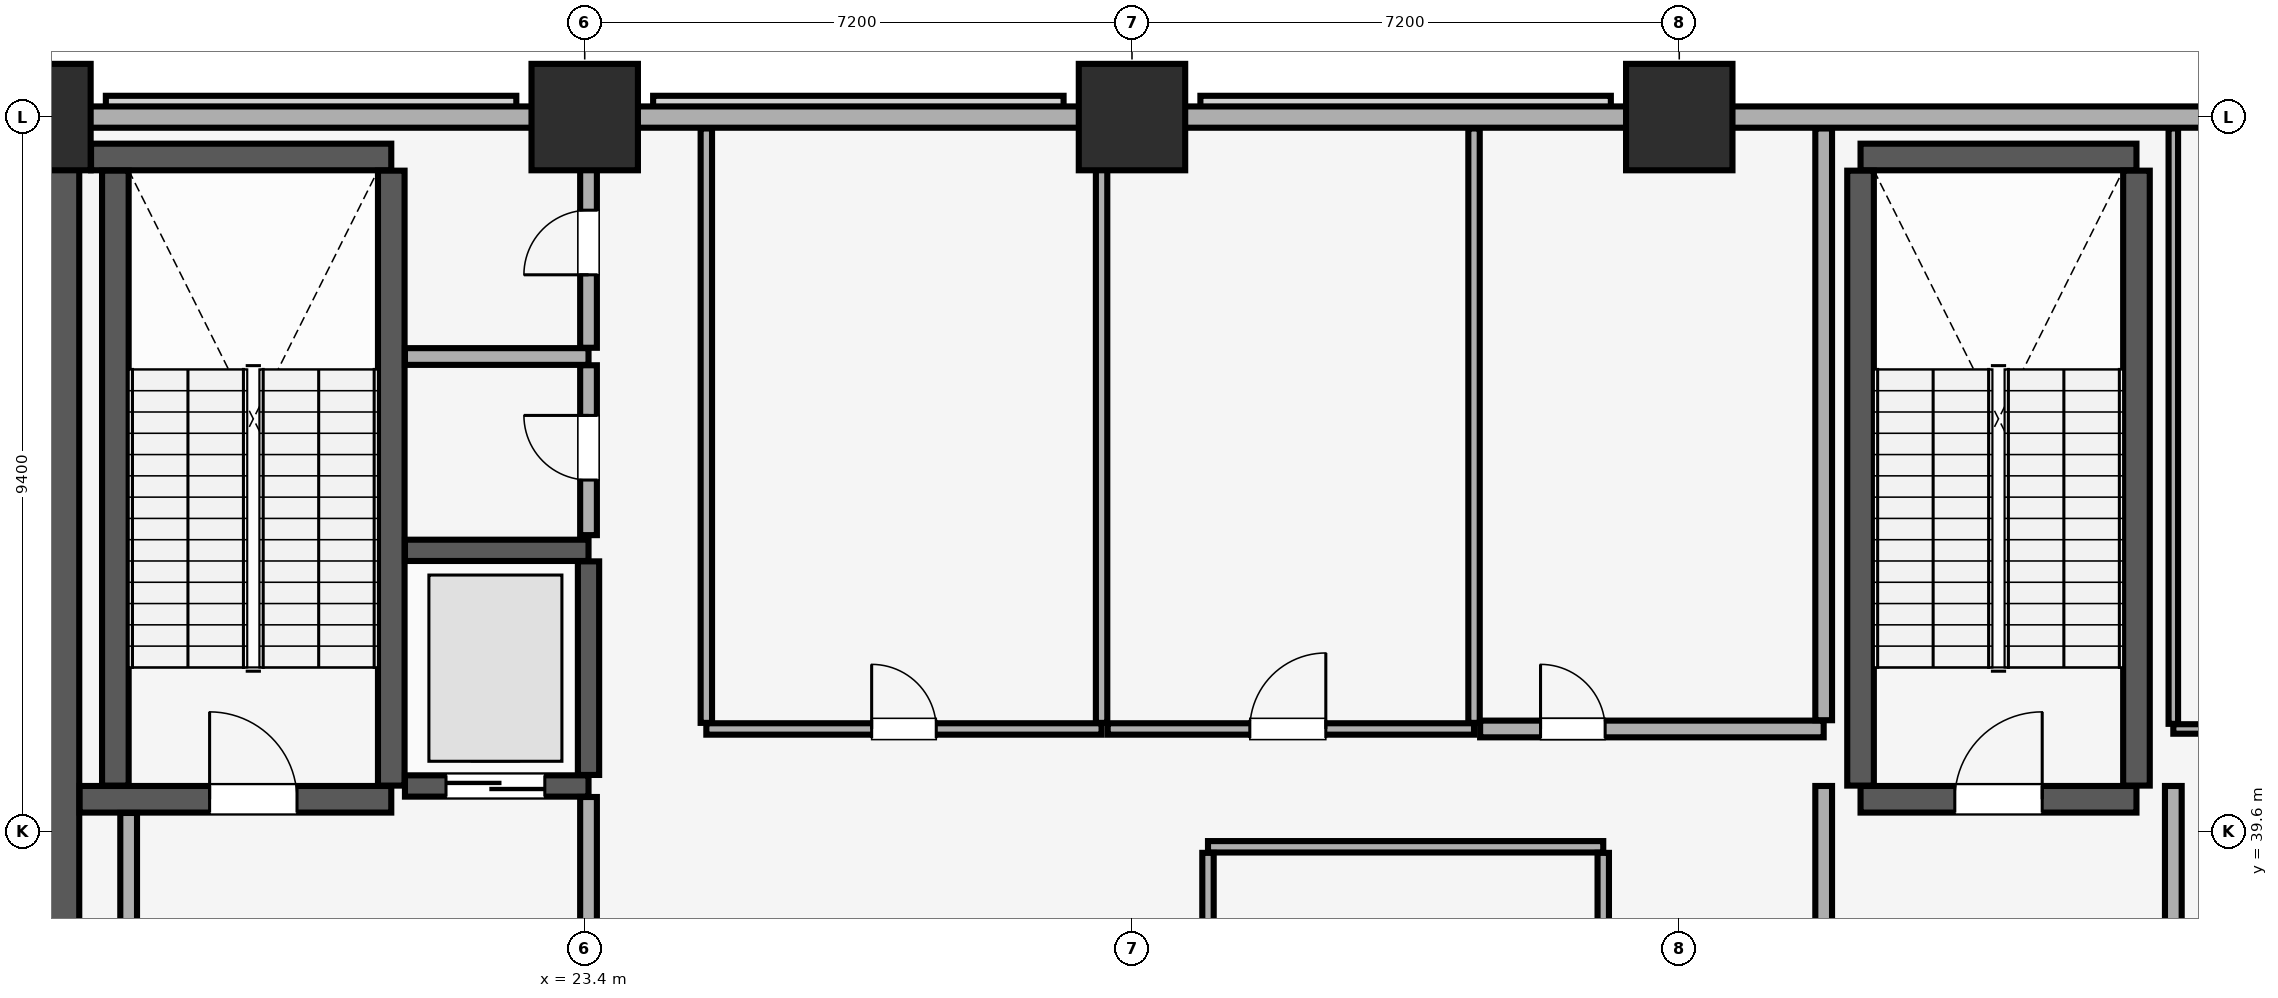
"""IFC4 building model, lengths in metres.
Left out: names, types, materials, properties, quantities, classifications, styles, units other than length and angle.
Written with IfcOpenShell. Run it as: python <this file> out.ifc"""

import sys

from ifc_helpers import new_model, si_unit, direction, frame, frame_2d, origin, origin_2d, place, context, subcontext, project, spatial, rectangle, extrude, element, fill, save


model = new_model("IFC4")
c1 = context("Model", 3, precision=1e-05, world=origin(), true_north=direction((0.0, 1.0)))
c2 = subcontext(c1, "Body", "Model", "MODEL_VIEW")
j1 = project(units=[si_unit("LENGTHUNIT", "METRE"), si_unit("PLANEANGLEUNIT", "RADIAN")], contexts=[c1])
p1 = place(None, origin())
s1 = spatial("IfcSite", under=j1, at=p1, CompositionType="ELEMENT")
p2 = place(p1, origin())
s2 = spatial("IfcBuilding", under=s1, at=p2, CompositionType="ELEMENT")
p3 = place(p2, frame((0.0, 0.0, 80.15)))
s3 = spatial("IfcBuildingStorey", under=s2, at=p3, CompositionType="ELEMENT", Elevation=80.15)
for number, where, z_axis, x_axis in (
    (1, (16.2, 49.0, 0.0), (0.0, 0.0, 1.0), (1.0, 0.0, 0.0)),
    (2, (23.4, 49.0, 0.0), (0.0, 0.0, 1.0), (1.0, 0.0, 0.0)),
    (3, (30.6, 49.0, 0.0), (0.0, 0.0, 1.0), (1.0, 0.0, 0.0)),
    (4, (37.8, 49.0, 0.0), (0.0, 0.0, 1.0), (1.0, 0.0, 0.0)),
):
    element("IfcColumn", number, at=place(p3, frame(where, z_axis=z_axis, x_axis=x_axis)), inside=s3, PredefinedType="COLUMN", context=c2, shape_type="SweptSolid", body=[
        extrude(rectangle(XDim=1.4, YDim=1.4, at=origin_2d()), origin(), (0.0, 0.0, 1.0), 5.16),
    ])
p4 = place(p3, frame((79.8, 49.0, 0.0), z_axis=(0.0, 0.0, 1.0), x_axis=(-1.0, 0.0, 0.0)))
e5 = element("IfcWall", 5, at=p4, inside=s3, PredefinedType="SOLIDWALL", context=c2, shape_type="SweptSolid", body=[
    extrude(rectangle(XDim=75.6, YDim=0.28, at=frame_2d((37.8, 0.0))), origin(), (0.0, 0.0, 1.0), 4.21),
])
p5 = place(p3, frame((16.2, 29.4, 0.0), z_axis=(0.0, 0.0, 1.0), x_axis=(0.0, 1.0, 0.0)))
e6 = element("IfcWall", 6, at=p5, inside=s3, PredefinedType="SHEAR", context=c2, shape_type="SweptSolid", body=[
    extrude(rectangle(XDim=19.2, YDim=1.1, at=frame_2d((9.6, 0.0))), origin(), (0.0, 0.0, 1.0), 5.16),
])
p6 = place(p3, frame((16.755, 40.025, 0.0), z_axis=(0.0, 0.0, 1.0), x_axis=(1.0, 0.0, 0.0)))
e7 = element("IfcWall", 7, at=p6, inside=s3, PredefinedType="SHEAR", context=c2, shape_type="SweptSolid", body=[
    extrude(rectangle(XDim=4.1, YDim=0.35, at=frame_2d((2.05, 0.0))), origin(), (0.0, 0.0, 1.0), 5.16),
])
p7 = place(p6, frame((1.71, 0.0, 0.0)))
e8 = element("IfcOpeningElement", 8, at=p7, cuts=e7, PredefinedType="OPENING", context=c2, shape_type="SweptSolid", body=[
    extrude(rectangle(XDim=1.15, YDim=2.15, at=frame_2d((0.575, 1.075))), frame((0.0, 0.185, 0.0), z_axis=(0.0, -1.0, 0.0), x_axis=(1.0, 0.0, 0.0)), (0.0, 0.0, 1.0), 0.37),
])
p8 = place(p3, frame((16.905, 48.475, 0.0), z_axis=(0.0, 0.0, 1.0), x_axis=(1.0, 0.0, 0.0)))
e9 = element("IfcWall", 9, at=p8, inside=s3, PredefinedType="SHEAR", context=c2, shape_type="SweptSolid", body=[
    extrude(rectangle(XDim=3.95, YDim=0.35, at=frame_2d((1.975, 0.0))), origin(), (0.0, 0.0, 1.0), 5.16),
])
for number, where, z_axis, x_axis in (
    (10, (17.225, 40.205, 0.0), (0.0, 0.0, 1.0), (0.0, 1.0, 0.0)),
    (11, (20.855, 40.205, 0.0), (0.0, 0.0, 1.0), (0.0, 1.0, 0.0)),
):
    element("IfcWall", number, at=place(p3, frame(where, z_axis=z_axis, x_axis=x_axis)), inside=s3, PredefinedType="SHEAR", context=c2, shape_type="SweptSolid", body=[
        extrude(rectangle(XDim=8.09, YDim=0.35, at=frame_2d((4.045, 0.0))), origin(), (0.0, 0.0, 1.0), 5.16),
    ])
p9 = place(p3, frame((40.185, 40.025, 0.0), z_axis=(0.0, 0.0, 1.0), x_axis=(1.0, 0.0, 0.0)))
e12 = element("IfcWall", 12, at=p9, inside=s3, PredefinedType="SHEAR", context=c2, shape_type="SweptSolid", body=[
    extrude(rectangle(XDim=3.63, YDim=0.35, at=frame_2d((1.815, 0.0))), origin(), (0.0, 0.0, 1.0), 5.16),
])
p10 = place(p9, frame((1.24, 0.0, 0.0)))
e13 = element("IfcOpeningElement", 13, at=p10, cuts=e12, PredefinedType="OPENING", context=c2, shape_type="SweptSolid", body=[
    extrude(rectangle(XDim=1.15, YDim=2.15, at=frame_2d((0.575, 1.075))), frame((0.0, 0.185, 0.0), z_axis=(0.0, -1.0, 0.0), x_axis=(1.0, 0.0, 0.0)), (0.0, 0.0, 1.0), 0.37),
])
p11 = place(p3, frame((40.185, 48.475, 0.0), z_axis=(0.0, 0.0, 1.0), x_axis=(1.0, 0.0, 0.0)))
e14 = element("IfcWall", 14, at=p11, inside=s3, PredefinedType="SHEAR", context=c2, shape_type="SweptSolid", body=[
    extrude(rectangle(XDim=3.63, YDim=0.35, at=frame_2d((1.815, 0.0))), origin(), (0.0, 0.0, 1.0), 5.16),
])
for number, where, z_axis, x_axis in (
    (15, (40.185, 40.205, 0.0), (0.0, 0.0, 1.0), (0.0, 1.0, 0.0)),
    (16, (43.815, 40.205, 0.0), (0.0, 0.0, 1.0), (0.0, 1.0, 0.0)),
):
    element("IfcWall", number, at=place(p3, frame(where, z_axis=z_axis, x_axis=x_axis)), inside=s3, PredefinedType="SHEAR", context=c2, shape_type="SweptSolid", body=[
        extrude(rectangle(XDim=8.09, YDim=0.35, at=frame_2d((4.045, 0.0))), origin(), (0.0, 0.0, 1.0), 5.16),
    ])
p12 = place(p3, frame((21.035, 40.2, 0.0), z_axis=(0.0, 0.0, 1.0), x_axis=(1.0, 0.0, 0.0)))
e17 = element("IfcWall", 17, at=p12, inside=s3, PredefinedType="SHEAR", context=c2, shape_type="SweptSolid", body=[
    extrude(rectangle(XDim=2.415, YDim=0.28, at=frame_2d((1.208, 0.0))), origin(), (0.0, 0.0, 1.0), 5.16),
])
p13 = place(p12, frame((0.54, 0.0, 0.0)))
e18 = element("IfcOpeningElement", 18, at=p13, cuts=e17, PredefinedType="OPENING", context=c2, shape_type="SweptSolid", body=[
    extrude(rectangle(XDim=1.3, YDim=2.3, at=frame_2d((0.65, 1.15))), frame((0.0, 0.15, 0.0), z_axis=(0.0, -1.0, 0.0), x_axis=(1.0, 0.0, 0.0)), (0.0, 0.0, 1.0), 0.3),
])
p14 = place(p3, frame((21.035, 43.3, 0.0), z_axis=(0.0, 0.0, 1.0), x_axis=(1.0, 0.0, 0.0)))
e19 = element("IfcWall", 19, at=p14, inside=s3, PredefinedType="SHEAR", context=c2, shape_type="SweptSolid", body=[
    extrude(rectangle(XDim=2.415, YDim=0.28, at=frame_2d((1.208, 0.0))), origin(), (0.0, 0.0, 1.0), 5.16),
])
p15 = place(p3, frame((23.45, 40.345, 0.0), z_axis=(0.0, 0.0, 1.0), x_axis=(0.0, 1.0, 0.0)))
e20 = element("IfcWall", 20, at=p15, inside=s3, PredefinedType="SHEAR", context=c2, shape_type="SweptSolid", body=[
    extrude(rectangle(XDim=2.81, YDim=0.28, at=frame_2d((1.405, 0.0))), origin(), (0.0, 0.0, 1.0), 5.16),
])
p16 = place(p3, frame((17.4, 34.415, 0.0), z_axis=(0.0, 0.0, 1.0), x_axis=(0.0, 1.0, 0.0)))
e21 = element("IfcWall", 21, at=p16, inside=s3, PredefinedType="PARTITIONING", context=c2, shape_type="SweptSolid", body=[
    extrude(rectangle(XDim=5.43, YDim=0.22, at=frame_2d((2.715, 0.0))), origin(), (0.0, 0.0, 1.0), 5.16),
])
p17 = place(p3, frame((23.45, 34.415, 0.0), z_axis=(0.0, 0.0, 1.0), x_axis=(0.0, 1.0, 0.0)))
e22 = element("IfcWall", 22, at=p17, inside=s3, PredefinedType="PARTITIONING", context=c2, shape_type="SweptSolid", body=[
    extrude(rectangle(XDim=5.64, YDim=0.22, at=frame_2d((2.82, 0.0))), origin(), (0.0, 0.0, 1.0), 5.16),
])
for number, where, z_axis, x_axis in (
    (23, (39.7, 34.415, 0.0), (0.0, 0.0, 1.0), (0.0, 1.0, 0.0)),
    (24, (44.3, 34.415, 0.0), (0.0, 0.0, 1.0), (0.0, 1.0, 0.0)),
):
    element("IfcWall", number, at=place(p3, frame(where, z_axis=z_axis, x_axis=x_axis)), inside=s3, PredefinedType="PARTITIONING", context=c2, shape_type="SweptSolid", body=[
        extrude(rectangle(XDim=5.785, YDim=0.22, at=frame_2d((2.893, 0.0))), origin(), (0.0, 0.0, 1.0), 5.16),
    ])
p18 = place(p3, frame((21.035, 45.85, 0.0), z_axis=(0.0, 0.0, 1.0), x_axis=(1.0, 0.0, 0.0)))
e25 = element("IfcWall", 25, at=p18, inside=s3, PredefinedType="PARTITIONING", context=c2, shape_type="SweptSolid", body=[
    extrude(rectangle(XDim=2.415, YDim=0.22, at=frame_2d((1.208, 0.0))), origin(), (0.0, 0.0, 1.0), 5.16),
])
p19 = place(p3, frame((23.45, 43.5, 0.0), z_axis=(0.0, 0.0, 1.0), x_axis=(0.0, 1.0, 0.0)))
e26 = element("IfcWall", 26, at=p19, inside=s3, PredefinedType="PARTITIONING", context=c2, shape_type="SweptSolid", body=[
    extrude(rectangle(XDim=2.235, YDim=0.22, at=frame_2d((1.118, 0.0))), origin(), (0.0, 0.0, 1.0), 5.16),
])
p20 = place(p19, frame((0.725, 0.0, 0.0)))
e27 = element("IfcOpeningElement", 27, at=p20, cuts=e26, PredefinedType="OPENING", context=c2, shape_type="SweptSolid", body=[
    extrude(rectangle(XDim=0.85, YDim=2.1, at=frame_2d((0.425, 1.05))), frame((0.0, 0.12, 0.0), z_axis=(0.0, -1.0, 0.0), x_axis=(1.0, 0.0, 0.0)), (0.0, 0.0, 1.0), 0.24),
])
p21 = place(p3, frame((23.45, 45.965, 0.0), z_axis=(0.0, 0.0, 1.0), x_axis=(0.0, 1.0, 0.0)))
e28 = element("IfcWall", 28, at=p21, inside=s3, PredefinedType="PARTITIONING", context=c2, shape_type="SweptSolid", body=[
    extrude(rectangle(XDim=2.885, YDim=0.22, at=frame_2d((1.442, 0.0))), origin(), (0.0, 0.0, 1.0), 5.16),
])
p22 = place(p21, frame((0.96, 0.0, 0.0)))
e29 = element("IfcOpeningElement", 29, at=p22, cuts=e28, PredefinedType="OPENING", context=c2, shape_type="SweptSolid", body=[
    extrude(rectangle(XDim=0.85, YDim=2.1, at=frame_2d((0.425, 1.05))), frame((0.0, 0.12, 0.0), z_axis=(0.0, -1.0, 0.0), x_axis=(1.0, 0.0, 0.0)), (0.0, 0.0, 1.0), 0.24),
])
p23 = place(p3, frame((31.6, 39.4, 0.0), z_axis=(0.0, 0.0, 1.0), x_axis=(1.0, 0.0, 0.0)))
e30 = element("IfcWall", 30, at=p23, inside=s3, PredefinedType="PARTITIONING", context=c2, shape_type="SweptSolid", body=[
    extrude(rectangle(XDim=5.2, YDim=0.15, at=frame_2d((2.6, 0.0))), origin(), (0.0, 0.0, 1.0), 5.16),
])
for number, where, z_axis, x_axis in (
    (31, (31.6, 34.38, 0.0), (0.0, 0.0, 1.0), (0.0, 1.0, 0.0)),
    (32, (36.8, 34.38, 0.0), (0.0, 0.0, 1.0), (0.0, 1.0, 0.0)),
):
    element("IfcWall", number, at=place(p3, frame(where, z_axis=z_axis, x_axis=x_axis)), inside=s3, PredefinedType="PARTITIONING", context=c2, shape_type="SweptSolid", body=[
        extrude(rectangle(XDim=4.94, YDim=0.15, at=frame_2d((2.47, 0.0))), origin(), (0.0, 0.0, 1.0), 5.16),
    ])
p24 = place(p3, frame((25.0, 40.95, 0.0), z_axis=(0.0, 0.0, 1.0), x_axis=(1.0, 0.0, 0.0)))
e33 = element("IfcWall", 33, at=p24, inside=s3, PredefinedType="PARTITIONING", context=c2, shape_type="SweptSolid", body=[
    extrude(rectangle(XDim=5.2, YDim=0.15, at=frame_2d((2.6, 0.0))), origin(), (0.0, 0.0, 1.0), 5.16),
])
p25 = place(p24, frame((2.175, 0.0, 0.0)))
e34 = element("IfcOpeningElement", 34, at=p25, cuts=e33, PredefinedType="OPENING", context=c2, shape_type="SweptSolid", body=[
    extrude(rectangle(XDim=0.85, YDim=2.1, at=frame_2d((0.425, 1.05))), frame((0.0, 0.085, 0.0), z_axis=(0.0, -1.0, 0.0), x_axis=(1.0, 0.0, 0.0)), (0.0, 0.0, 1.0), 0.17),
])
for number, where, z_axis, x_axis in (
    (35, (25.0, 41.03, 0.0), (0.0, 0.0, 1.0), (0.0, 1.0, 0.0)),
    (36, (30.2, 41.03, 0.0), (0.0, 0.0, 1.0), (0.0, 1.0, 0.0)),
):
    element("IfcWall", number, at=place(p3, frame(where, z_axis=z_axis, x_axis=x_axis)), inside=s3, PredefinedType="PARTITIONING", context=c2, shape_type="SweptSolid", body=[
        extrude(rectangle(XDim=7.82, YDim=0.15, at=frame_2d((3.91, 0.0))), origin(), (0.0, 0.0, 1.0), 5.16),
    ])
p26 = place(p3, frame((30.28, 40.95, 0.0), z_axis=(0.0, 0.0, 1.0), x_axis=(1.0, 0.0, 0.0)))
e37 = element("IfcWall", 37, at=p26, inside=s3, PredefinedType="PARTITIONING", context=c2, shape_type="SweptSolid", body=[
    extrude(rectangle(XDim=4.82, YDim=0.15, at=frame_2d((2.41, 0.0))), origin(), (0.0, 0.0, 1.0), 5.16),
])
p27 = place(p26, frame((1.87, 0.0, 0.0)))
e38 = element("IfcOpeningElement", 38, at=p27, cuts=e37, PredefinedType="OPENING", context=c2, shape_type="SweptSolid", body=[
    extrude(rectangle(XDim=1.0, YDim=2.15, at=frame_2d((0.5, 1.075))), frame((0.0, 0.085, 0.0), z_axis=(0.0, -1.0, 0.0), x_axis=(1.0, 0.0, 0.0)), (0.0, 0.0, 1.0), 0.17),
])
p28 = place(p3, frame((35.1, 41.03, 0.0), z_axis=(0.0, 0.0, 1.0), x_axis=(0.0, 1.0, 0.0)))
e39 = element("IfcWall", 39, at=p28, inside=s3, PredefinedType="PARTITIONING", context=c2, shape_type="SweptSolid", body=[
    extrude(rectangle(XDim=7.82, YDim=0.15, at=frame_2d((3.91, 0.0))), origin(), (0.0, 0.0, 1.0), 5.16),
])
p29 = place(p3, frame((35.18, 40.95, 0.0), z_axis=(0.0, 0.0, 1.0), x_axis=(1.0, 0.0, 0.0)))
e40 = element("IfcWall", 40, at=p29, inside=s3, PredefinedType="PARTITIONING", context=c2, shape_type="SweptSolid", body=[
    extrude(rectangle(XDim=4.52, YDim=0.22, at=frame_2d((2.26, 0.0))), origin(), (0.0, 0.0, 1.0), 5.16),
])
p30 = place(p29, frame((0.795, 0.0, 0.0)))
e41 = element("IfcOpeningElement", 41, at=p30, cuts=e40, PredefinedType="OPENING", context=c2, shape_type="SweptSolid", body=[
    extrude(rectangle(XDim=0.85, YDim=2.1, at=frame_2d((0.425, 1.05))), frame((0.0, 0.12, 0.0), z_axis=(0.0, -1.0, 0.0), x_axis=(1.0, 0.0, 0.0)), (0.0, 0.0, 1.0), 0.24),
])
p31 = place(p3, frame((39.7, 41.065, 0.0), z_axis=(0.0, 0.0, 1.0), x_axis=(0.0, 1.0, 0.0)))
e42 = element("IfcWall", 42, at=p31, inside=s3, PredefinedType="PARTITIONING", context=c2, shape_type="SweptSolid", body=[
    extrude(rectangle(XDim=7.785, YDim=0.22, at=frame_2d((3.893, 0.0))), origin(), (0.0, 0.0, 1.0), 5.16),
])
p32 = place(p3, frame((44.3, 40.95, 0.0), z_axis=(0.0, 0.0, 1.0), x_axis=(1.0, 0.0, 0.0)))
e43 = element("IfcWall", 43, at=p32, inside=s3, PredefinedType="PARTITIONING", context=c2, shape_type="SweptSolid", body=[
    extrude(rectangle(XDim=3.1, YDim=0.125, at=frame_2d((1.55, 0.0))), origin(), (0.0, 0.0, 1.0), 5.16),
])
p33 = place(p32, frame((1.1, 0.0, 0.0)))
e44 = element("IfcOpeningElement", 44, at=p33, cuts=e43, PredefinedType="OPENING", context=c2, shape_type="SweptSolid", body=[
    extrude(rectangle(XDim=0.9, YDim=2.1, at=frame_2d((0.45, 1.05))), frame((0.0, 0.073, 0.0), z_axis=(0.0, -1.0, 0.0), x_axis=(1.0, 0.0, 0.0)), (0.0, 0.0, 1.0), 0.145),
])
p34 = place(p3, frame((44.3, 41.018, 0.0), z_axis=(0.0, 0.0, 1.0), x_axis=(0.0, 1.0, 0.0)))
e45 = element("IfcWall", 45, at=p34, inside=s3, PredefinedType="PARTITIONING", context=c2, shape_type="SweptSolid", body=[
    extrude(rectangle(XDim=7.833, YDim=0.125, at=frame_2d((3.916, 0.0))), origin(), (0.0, 0.0, 1.0), 5.16),
])
p35 = place(p7, origin())
e46 = element("IfcDoor", 46, at=p35, inside=s3, OperationType="SINGLE_SWING_LEFT", PredefinedType="DOOR", context=c2, shape_type="SweptSolid", body=[
    extrude(rectangle(XDim=1.15, YDim=2.15, at=frame_2d((0.575, 1.075))), frame((0.0, 0.025, 0.0), z_axis=(0.0, -1.0, 0.0), x_axis=(1.0, 0.0, 0.0)), (0.0, 0.0, 1.0), 0.05),
])
fill(e8, e46)
p36 = place(p10, origin())
e47 = element("IfcDoor", 47, at=p36, inside=s3, OperationType="SINGLE_SWING_RIGHT", PredefinedType="DOOR", context=c2, shape_type="SweptSolid", body=[
    extrude(rectangle(XDim=1.15, YDim=2.15, at=frame_2d((0.575, 1.075))), frame((0.0, 0.025, 0.0), z_axis=(0.0, -1.0, 0.0), x_axis=(1.0, 0.0, 0.0)), (0.0, 0.0, 1.0), 0.05),
])
fill(e13, e47)
p37 = place(p13, origin())
e48 = element("IfcDoor", 48, at=p37, inside=s3, OperationType="DOUBLE_DOOR_SLIDING", PredefinedType="DOOR", context=c2, shape_type="SweptSolid", body=[
    extrude(rectangle(XDim=1.3, YDim=2.3, at=frame_2d((0.65, 1.15))), frame((0.0, 0.025, 0.0), z_axis=(0.0, -1.0, 0.0), x_axis=(1.0, 0.0, 0.0)), (0.0, 0.0, 1.0), 0.05),
])
fill(e18, e48)
p38 = place(p20, origin())
e49 = element("IfcDoor", 49, at=p38, inside=s3, OperationType="SINGLE_SWING_RIGHT", PredefinedType="DOOR", context=c2, shape_type="SweptSolid", body=[
    extrude(rectangle(XDim=0.85, YDim=2.1, at=frame_2d((0.425, 1.05))), frame((0.0, 0.025, 0.0), z_axis=(0.0, -1.0, 0.0), x_axis=(1.0, 0.0, 0.0)), (0.0, 0.0, 1.0), 0.05),
])
fill(e27, e49)
p39 = place(p22, origin())
e50 = element("IfcDoor", 50, at=p39, inside=s3, OperationType="SINGLE_SWING_LEFT", PredefinedType="DOOR", context=c2, shape_type="SweptSolid", body=[
    extrude(rectangle(XDim=0.85, YDim=2.1, at=frame_2d((0.425, 1.05))), frame((0.0, 0.025, 0.0), z_axis=(0.0, -1.0, 0.0), x_axis=(1.0, 0.0, 0.0)), (0.0, 0.0, 1.0), 0.05),
])
fill(e29, e50)
p40 = place(p25, origin())
e51 = element("IfcDoor", 51, at=p40, inside=s3, OperationType="SINGLE_SWING_LEFT", PredefinedType="DOOR", context=c2, shape_type="SweptSolid", body=[
    extrude(rectangle(XDim=0.85, YDim=2.1, at=frame_2d((0.425, 1.05))), frame((0.0, 0.025, 0.0), z_axis=(0.0, -1.0, 0.0), x_axis=(1.0, 0.0, 0.0)), (0.0, 0.0, 1.0), 0.05),
])
fill(e34, e51)
p41 = place(p27, origin())
e52 = element("IfcDoor", 52, at=p41, inside=s3, OperationType="SINGLE_SWING_RIGHT", PredefinedType="DOOR", context=c2, shape_type="SweptSolid", body=[
    extrude(rectangle(XDim=1.0, YDim=2.15, at=frame_2d((0.5, 1.075))), frame((0.0, 0.025, 0.0), z_axis=(0.0, -1.0, 0.0), x_axis=(1.0, 0.0, 0.0)), (0.0, 0.0, 1.0), 0.05),
])
fill(e38, e52)
p42 = place(p30, origin())
e53 = element("IfcDoor", 53, at=p42, inside=s3, OperationType="SINGLE_SWING_LEFT", PredefinedType="DOOR", context=c2, shape_type="SweptSolid", body=[
    extrude(rectangle(XDim=0.85, YDim=2.1, at=frame_2d((0.425, 1.05))), frame((0.0, 0.025, 0.0), z_axis=(0.0, -1.0, 0.0), x_axis=(1.0, 0.0, 0.0)), (0.0, 0.0, 1.0), 0.05),
])
fill(e41, e53)
save(model, sys.argv[1])
